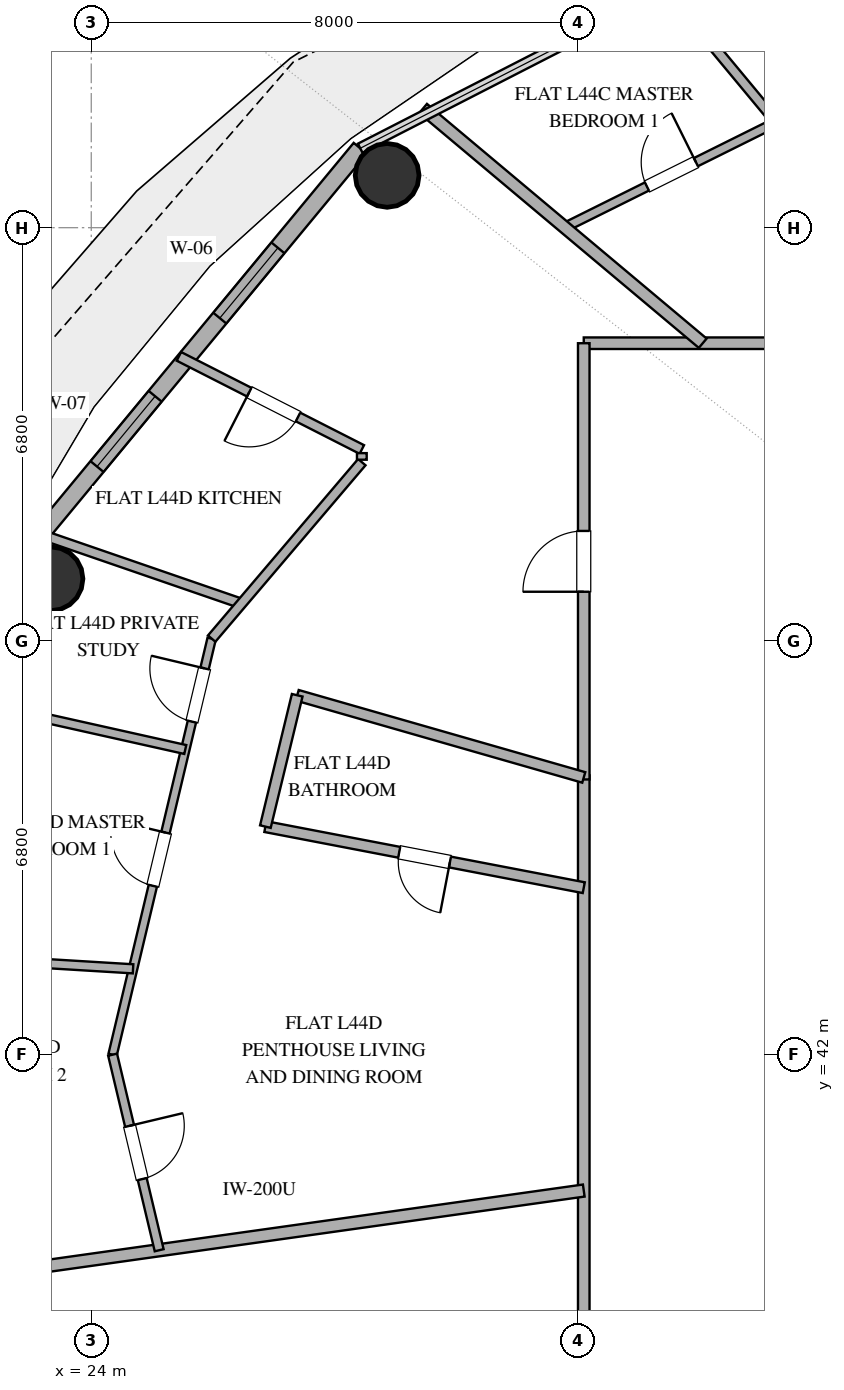
"""IFC4 building model, lengths in metres.
Left out: names, types, materials, properties, quantities, classifications, styles, units other than length and angle.
Written with IfcOpenShell. Run it as: python <this file> out.ifc"""

import sys

from ifc_helpers import new_model, si_unit, direction, frame, frame_2d, origin, origin_2d, place, context, subcontext, project, spatial, rectangle, hollow_circle, extrude, element, fill, save


model = new_model("IFC4")
c1 = context("Model", 3, precision=1e-05, world=origin(), true_north=direction((0.0, 1.0)))
c2 = subcontext(c1, "Body", "Model", "MODEL_VIEW")
j1 = project(units=[si_unit("LENGTHUNIT", "METRE"), si_unit("PLANEANGLEUNIT", "RADIAN")], contexts=[c1])
p1 = place(None, origin())
s1 = spatial("IfcSite", under=j1, at=p1, CompositionType="ELEMENT")
p2 = place(p1, origin())
s2 = spatial("IfcBuilding", under=s1, at=p2, CompositionType="ELEMENT")
p3 = place(p2, frame((0.0, 0.0, 175.8)))
s3 = spatial("IfcBuildingStorey", under=s2, at=p3, CompositionType="ELEMENT", Elevation=175.8)
for number, where, z_axis, x_axis in (
    (1, (28.866, 56.46, 0.0), (0.0, 0.0, 1.0), (1.0, 0.0, 0.0)),
    (2, (23.338, 49.826, 0.0), (0.0, 0.0, 1.0), (1.0, 0.0, 0.0)),
):
    element("IfcColumn", number, at=place(p3, frame(where, z_axis=z_axis, x_axis=x_axis)), inside=s3, PredefinedType="COLUMN", context=c2, shape_type="SweptSolid", body=[
        extrude(hollow_circle(Radius=0.525, WallThickness=0.028, at=origin_2d()), origin(), (0.0, 0.0, 1.0), 3.38),
    ])
p4 = place(p3, frame((28.424, 56.906, 0.0), z_axis=(0.0, 0.0, 1.0), x_axis=(-0.637333477683, -0.770588111915, 0.0)))
e3 = element("IfcWall", 3, at=p4, inside=s3, PredefinedType="SOLIDWALL", context=c2, shape_type="SweptSolid", body=[
    extrude(rectangle(XDim=8.875, YDim=0.28, at=frame_2d((4.438, 0.0))), origin(), (0.0, 0.0, 1.0), 3.38),
])
p5 = place(p4, frame((2.125, 0.0, 0.85)))
e4 = element("IfcOpeningElement", 4, at=p5, cuts=e3, PredefinedType="OPENING", context=c2, shape_type="SweptSolid", body=[
    extrude(rectangle(XDim=1.5, YDim=2.0, at=frame_2d((0.75, 1.0))), frame((0.0, 0.15, 0.0), z_axis=(0.0, -1.0, 0.0), x_axis=(1.0, 0.0, 0.0)), (0.0, 0.0, 1.0), 0.3),
])
p6 = place(p4, frame((5.292, 0.0, 0.85)))
e5 = element("IfcOpeningElement", 5, at=p6, cuts=e3, PredefinedType="OPENING", context=c2, shape_type="SweptSolid", body=[
    extrude(rectangle(XDim=1.5, YDim=1.8, at=frame_2d((0.75, 0.9))), frame((0.0, 0.15, 0.0), z_axis=(0.0, -1.0, 0.0), x_axis=(1.0, 0.0, 0.0)), (0.0, 0.0, 1.0), 0.3),
])
p7 = place(p3, frame((32.1, 53.7, 0.0), z_axis=(0.0, 0.0, 1.0), x_axis=(1.0, 0.0, 0.0)))
e6 = element("IfcWall", 6, at=p7, inside=s3, PredefinedType="PARTITIONING", context=c2, shape_type="SweptSolid", body=[
    extrude(rectangle(XDim=16.061, YDim=0.19, at=frame_2d((8.03, 0.0))), origin(), (0.0, 0.0, 1.0), 2.74),
])
p8 = place(p7, frame((6.907, 0.0, 0.0)))
e7 = element("IfcOpeningElement", 7, at=p8, cuts=e6, PredefinedType="OPENING", context=c2, shape_type="SweptSolid", body=[
    extrude(rectangle(XDim=1.0, YDim=2.2, at=frame_2d((0.5, 1.1))), frame((0.0, 0.105, 0.0), z_axis=(0.0, -1.0, 0.0), x_axis=(1.0, 0.0, 0.0)), (0.0, 0.0, 1.0), 0.21),
])
p9 = place(p3, frame((22.753, 38.452, 0.0), z_axis=(0.0, 0.0, 1.0), x_axis=(0.500584533727, -0.865687659952, 0.0)))
e8 = element("IfcWall", 8, at=p9, inside=s3, PredefinedType="PLUMBINGWALL", context=c2, shape_type="SweptSolid", body=[
    extrude(rectangle(XDim=9.567, YDim=0.16, at=frame_2d((4.783, 0.0))), origin(), (0.0, 0.0, 1.0), 2.74),
])
p10 = place(p9, frame((5.233, 0.0, 0.0)))
e9 = element("IfcOpeningElement", 9, at=p10, cuts=e8, PredefinedType="OPENING", context=c2, shape_type="SweptSolid", body=[
    extrude(rectangle(XDim=0.9, YDim=2.1, at=frame_2d((0.45, 1.05))), frame((0.0, 0.09, 0.0), z_axis=(0.0, -1.0, 0.0), x_axis=(1.0, 0.0, 0.0)), (0.0, 0.0, 1.0), 0.18),
])
p11 = place(p3, frame((32.1, 46.593, 0.0), z_axis=(0.0, 0.0, 1.0), x_axis=(0.0, -1.0, 0.0)))
e10 = element("IfcWall", 10, at=p11, inside=s3, PredefinedType="PARTITIONING", context=c2, shape_type="SweptSolid", body=[
    extrude(rectangle(XDim=16.292, YDim=0.19, at=frame_2d((8.146, 0.0))), origin(), (0.0, 0.0, 1.0), 2.74),
])
p12 = place(p3, frame((32.1, 46.526, 0.0), z_axis=(0.0, 0.0, 1.0), x_axis=(0.0, 1.0, 0.0)))
e11 = element("IfcWall", 11, at=p12, inside=s3, PredefinedType="PARTITIONING", context=c2, shape_type="SweptSolid", body=[
    extrude(rectangle(XDim=7.174, YDim=0.19, at=frame_2d((3.587, 0.0))), origin(), (0.0, 0.0, 1.0), 2.74),
])
p13 = place(p12, frame((3.087, 0.0, 0.0)))
e12 = element("IfcOpeningElement", 12, at=p13, cuts=e11, PredefinedType="OPENING", context=c2, shape_type="SweptSolid", body=[
    extrude(rectangle(XDim=1.0, YDim=2.2, at=frame_2d((0.5, 1.1))), frame((0.0, 0.105, 0.0), z_axis=(0.0, -1.0, 0.0), x_axis=(1.0, 0.0, 0.0)), (0.0, 0.0, 1.0), 0.21),
])
p14 = place(p3, frame((21.635, 38.295, 0.0), z_axis=(0.0, 0.0, 1.0), x_axis=(0.990268074466, 0.139173060229, 0.0)))
e13 = element("IfcWall", 13, at=p14, inside=s3, PredefinedType="PARTITIONING", context=c2, shape_type="SweptSolid", body=[
    extrude(rectangle(XDim=10.567, YDim=0.2, at=frame_2d((5.284, 0.0))), origin(), (0.0, 0.0, 1.0), 2.74),
])
p15 = place(p3, frame((32.1, 44.746, 0.0), z_axis=(0.0, 0.0, 1.0), x_axis=(-0.982104947805, 0.188334467098, 0.0)))
e14 = element("IfcWall", 14, at=p15, inside=s3, PredefinedType="PLUMBINGWALL", context=c2, shape_type="SweptSolid", body=[
    extrude(rectangle(XDim=5.332, YDim=0.18, at=frame_2d((2.666, 0.0))), origin(), (0.0, 0.0, 1.0), 2.74),
])
p16 = place(p15, frame((2.241, 0.0, 0.0)))
e15 = element("IfcOpeningElement", 15, at=p16, cuts=e14, PredefinedType="OPENING", context=c2, shape_type="SweptSolid", body=[
    extrude(rectangle(XDim=0.85, YDim=2.1, at=frame_2d((0.425, 1.05))), frame((0.0, 0.1, 0.0), z_axis=(0.0, -1.0, 0.0), x_axis=(1.0, 0.0, 0.0)), (0.0, 0.0, 1.0), 0.2),
])
p17 = place(p3, frame((27.387, 47.911, 0.0), z_axis=(0.0, 0.0, 1.0), x_axis=(0.961266088446, -0.27562203686, 0.0)))
e16 = element("IfcWall", 16, at=p17, inside=s3, PredefinedType="PLUMBINGWALL", context=c2, shape_type="SweptSolid", body=[
    extrude(rectangle(XDim=4.903, YDim=0.18, at=frame_2d((2.451, 0.0))), origin(), (0.0, 0.0, 1.0), 2.74),
])
p18 = place(p3, frame((31.786, 55.605, 0.0), z_axis=(0.0, 0.0, 1.0), x_axis=(0.895458573673, 0.445144856013, 0.0)))
e17 = element("IfcWall", 17, at=p18, inside=s3, PredefinedType="PARTITIONING", context=c2, shape_type="SweptSolid", body=[
    extrude(rectangle(XDim=3.92, YDim=0.15, at=frame_2d((1.96, 0.0))), origin(), (0.0, 0.0, 1.0), 2.74),
])
p19 = place(p18, frame((1.51, 0.0, 0.0)))
e18 = element("IfcOpeningElement", 18, at=p19, cuts=e17, PredefinedType="OPENING", context=c2, shape_type="SweptSolid", body=[
    extrude(rectangle(XDim=0.9, YDim=2.1, at=frame_2d((0.45, 1.05))), frame((0.0, 0.085, 0.0), z_axis=(0.0, -1.0, 0.0), x_axis=(1.0, 0.0, 0.0)), (0.0, 0.0, 1.0), 0.17),
])
p20 = place(p3, frame((24.351, 42.0, 0.0), z_axis=(0.0, 0.0, 1.0), x_axis=(0.231658068135, 0.972797275627, 0.0)))
e19 = element("IfcWall", 19, at=p20, inside=s3, PredefinedType="PARTITIONING", context=c2, shape_type="SweptSolid", body=[
    extrude(rectangle(XDim=7.034, YDim=0.14, at=frame_2d((3.517, 0.0))), origin(), (0.0, 0.0, 1.0), 2.74),
])
p21 = place(p20, frame((2.855, 0.0, 0.0)))
e20 = element("IfcOpeningElement", 20, at=p21, cuts=e19, PredefinedType="OPENING", context=c2, shape_type="SweptSolid", body=[
    extrude(rectangle(XDim=0.9, YDim=2.1, at=frame_2d((0.45, 1.05))), frame((0.0, 0.08, 0.0), z_axis=(0.0, -1.0, 0.0), x_axis=(1.0, 0.0, 0.0)), (0.0, 0.0, 1.0), 0.16),
])
p22 = place(p20, frame((5.63, 0.0, 0.0)))
e21 = element("IfcOpeningElement", 21, at=p22, cuts=e19, PredefinedType="OPENING", context=c2, shape_type="SweptSolid", body=[
    extrude(rectangle(XDim=0.9, YDim=2.1, at=frame_2d((0.45, 1.05))), frame((0.0, 0.08, 0.0), z_axis=(0.0, -1.0, 0.0), x_axis=(1.0, 0.0, 0.0)), (0.0, 0.0, 1.0), 0.16),
])
p23 = place(p3, frame((26.471, 49.418, 0.0), z_axis=(0.0, 0.0, 1.0), x_axis=(-0.945442677411, 0.325788495392, 0.0)))
e22 = element("IfcWall", 22, at=p23, inside=s3, PredefinedType="PLUMBINGWALL", context=c2, shape_type="SweptSolid", body=[
    extrude(rectangle(XDim=3.61, YDim=0.16, at=frame_2d((1.805, 0.0))), origin(), (0.0, 0.0, 1.0), 2.74),
])
p24 = place(p3, frame((21.156, 43.626, 0.0), z_axis=(0.0, 0.0, 1.0), x_axis=(0.998171777701, -0.060440898408, 0.0)))
e23 = element("IfcWall", 23, at=p24, inside=s3, PredefinedType="PARTITIONING", context=c2, shape_type="SweptSolid", body=[
    extrude(rectangle(XDim=3.538, YDim=0.15, at=frame_2d((1.769, 0.0))), origin(), (0.0, 0.0, 1.0), 2.74),
])
p25 = place(p3, frame((25.546, 47.019, 0.0), z_axis=(0.0, 0.0, 1.0), x_axis=(-0.975921546644, 0.218121834754, 0.0)))
e24 = element("IfcWall", 24, at=p25, inside=s3, PredefinedType="PARTITIONING", context=c2, shape_type="SweptSolid", body=[
    extrude(rectangle(XDim=3.515, YDim=0.15, at=frame_2d((1.757, 0.0))), origin(), (0.0, 0.0, 1.0), 2.74),
])
p26 = place(p3, frame((28.45, 51.952, 0.0), z_axis=(0.0, 0.0, 1.0), x_axis=(-0.891148759763, 0.453711238535, 0.0)))
e25 = element("IfcWall", 25, at=p26, inside=s3, PredefinedType="PLUMBINGWALL", context=c2, shape_type="SweptSolid", body=[
    extrude(rectangle(XDim=3.375, YDim=0.16, at=frame_2d((1.688, 0.0))), origin(), (0.0, 0.0, 1.0), 2.74),
])
p27 = place(p26, frame((1.178, 0.0, 0.0)))
e26 = element("IfcOpeningElement", 26, at=p27, cuts=e25, PredefinedType="OPENING", context=c2, shape_type="SweptSolid", body=[
    extrude(rectangle(XDim=0.9, YDim=2.1, at=frame_2d((0.45, 1.05))), frame((0.0, 0.09, 0.0), z_axis=(0.0, -1.0, 0.0), x_axis=(1.0, 0.0, 0.0)), (0.0, 0.0, 1.0), 0.18),
])
p28 = place(p3, frame((24.351, 42.0, 0.0), z_axis=(0.0, 0.0, 1.0), x_axis=(0.231590575549, -0.972813345569, 0.0)))
e27 = element("IfcWall", 27, at=p28, inside=s3, PredefinedType="PARTITIONING", context=c2, shape_type="SweptSolid", body=[
    extrude(rectangle(XDim=3.306, YDim=0.15, at=frame_2d((1.653, 0.0))), origin(), (0.0, 0.0, 1.0), 2.74),
])
p29 = place(p28, frame((1.203, 0.0, 0.0)))
e28 = element("IfcOpeningElement", 28, at=p29, cuts=e27, PredefinedType="OPENING", context=c2, shape_type="SweptSolid", body=[
    extrude(rectangle(XDim=0.9, YDim=2.1, at=frame_2d((0.45, 1.05))), frame((0.0, 0.085, 0.0), z_axis=(0.0, -1.0, 0.0), x_axis=(1.0, 0.0, 0.0)), (0.0, 0.0, 1.0), 0.17),
])
p30 = place(p3, frame((25.981, 48.842, 0.0), z_axis=(0.0, 0.0, 1.0), x_axis=(0.648022171798, 0.761621470849, 0.0)))
e29 = element("IfcWall", 29, at=p30, inside=s3, PredefinedType="PLUMBINGWALL", context=c2, shape_type="SweptSolid", body=[
    extrude(rectangle(XDim=3.81, YDim=0.16, at=frame_2d((1.905, 0.0))), origin(), (0.0, 0.0, 1.0), 2.74),
])
p31 = place(p3, frame((34.056, 53.7, 0.0), z_axis=(0.0, 0.0, 1.0), x_axis=(-0.766037176398, 0.642796269728, 0.0)))
e30 = element("IfcWall", 30, at=p31, inside=s3, PredefinedType="PARTITIONING", context=c2, shape_type="SweptSolid", body=[
    extrude(rectangle(XDim=6.004, YDim=0.2, at=frame_2d((3.002, 0.0))), origin(), (0.0, 0.0, 1.0), 2.74),
])
p32 = place(p3, frame((35.264, 57.339, 0.0), z_axis=(0.0, 0.0, 1.0), x_axis=(-0.638753509407, 0.769411433643, 0.0)))
e31 = element("IfcWall", 31, at=p32, inside=s3, PredefinedType="PLUMBINGWALL", context=c2, shape_type="SweptSolid", body=[
    extrude(rectangle(XDim=2.922, YDim=0.16, at=frame_2d((1.461, 0.0))), origin(), (0.0, 0.0, 1.0), 2.74),
])
p33 = place(p3, frame((26.864, 45.75, 0.0), z_axis=(0.0, 0.0, 1.0), x_axis=(0.235499423966, 0.971874488456, 0.0)))
e32 = element("IfcWall", 32, at=p33, inside=s3, PredefinedType="PLUMBINGWALL", context=c2, shape_type="SweptSolid", body=[
    extrude(rectangle(XDim=2.223, YDim=0.18, at=frame_2d((1.111, 0.0))), origin(), (0.0, 0.0, 1.0), 2.74),
])
p34 = place(p3, frame((28.45, 51.784, 0.0), z_axis=(0.0, 0.0, 1.0), x_axis=(0.0, 1.0, 0.0)))
e33 = element("IfcWall", 33, at=p34, inside=s3, PredefinedType="PLUMBINGWALL", context=c2, shape_type="SweptSolid", body=[
    extrude(rectangle(XDim=0.108, YDim=0.16, at=frame_2d((0.054, 0.0))), origin(), (0.0, 0.0, 1.0), 2.74),
])
p35 = place(p5, origin())
e34 = element("IfcWindow", 34, at=p35, inside=s3, PartitioningType="SINGLE_PANEL", PredefinedType="WINDOW", context=c2, shape_type="SweptSolid", body=[
    extrude(rectangle(XDim=1.5, YDim=2.0, at=frame_2d((0.75, 1.0))), frame((0.0, 0.03, 0.0), z_axis=(0.0, -1.0, 0.0), x_axis=(1.0, 0.0, 0.0)), (0.0, 0.0, 1.0), 0.06),
])
fill(e4, e34)
p36 = place(p6, origin())
e35 = element("IfcWindow", 35, at=p36, inside=s3, PartitioningType="SINGLE_PANEL", PredefinedType="WINDOW", context=c2, shape_type="SweptSolid", body=[
    extrude(rectangle(XDim=1.5, YDim=1.8, at=frame_2d((0.75, 0.9))), frame((0.0, 0.03, 0.0), z_axis=(0.0, -1.0, 0.0), x_axis=(1.0, 0.0, 0.0)), (0.0, 0.0, 1.0), 0.06),
])
fill(e5, e35)
p37 = place(p13, origin())
e36 = element("IfcDoor", 36, at=p37, inside=s3, OperationType="SINGLE_SWING_LEFT", PredefinedType="DOOR", context=c2, shape_type="SweptSolid", body=[
    extrude(rectangle(XDim=1.0, YDim=2.2, at=frame_2d((0.5, 1.1))), frame((0.0, 0.025, 0.0), z_axis=(0.0, -1.0, 0.0), x_axis=(1.0, 0.0, 0.0)), (0.0, 0.0, 1.0), 0.05),
])
fill(e12, e36)
p38 = place(p16, origin())
e37 = element("IfcDoor", 37, at=p38, inside=s3, OperationType="SINGLE_SWING_LEFT", PredefinedType="DOOR", context=c2, shape_type="SweptSolid", body=[
    extrude(rectangle(XDim=0.85, YDim=2.1, at=frame_2d((0.425, 1.05))), frame((0.0, 0.025, 0.0), z_axis=(0.0, -1.0, 0.0), x_axis=(1.0, 0.0, 0.0)), (0.0, 0.0, 1.0), 0.05),
])
fill(e15, e37)
p39 = place(p19, origin())
e38 = element("IfcDoor", 38, at=p39, inside=s3, OperationType="SINGLE_SWING_RIGHT", PredefinedType="DOOR", context=c2, shape_type="SweptSolid", body=[
    extrude(rectangle(XDim=0.9, YDim=2.1, at=frame_2d((0.45, 1.05))), frame((0.0, 0.025, 0.0), z_axis=(0.0, -1.0, 0.0), x_axis=(1.0, 0.0, 0.0)), (0.0, 0.0, 1.0), 0.05),
])
fill(e18, e38)
p40 = place(p21, origin())
e39 = element("IfcDoor", 39, at=p40, inside=s3, OperationType="SINGLE_SWING_RIGHT", PredefinedType="DOOR", context=c2, shape_type="SweptSolid", body=[
    extrude(rectangle(XDim=0.9, YDim=2.1, at=frame_2d((0.45, 1.05))), frame((0.0, 0.025, 0.0), z_axis=(0.0, -1.0, 0.0), x_axis=(1.0, 0.0, 0.0)), (0.0, 0.0, 1.0), 0.05),
])
fill(e20, e39)
p41 = place(p22, origin())
e40 = element("IfcDoor", 40, at=p41, inside=s3, OperationType="SINGLE_SWING_RIGHT", PredefinedType="DOOR", context=c2, shape_type="SweptSolid", body=[
    extrude(rectangle(XDim=0.9, YDim=2.1, at=frame_2d((0.45, 1.05))), frame((0.0, 0.025, 0.0), z_axis=(0.0, -1.0, 0.0), x_axis=(1.0, 0.0, 0.0)), (0.0, 0.0, 1.0), 0.05),
])
fill(e21, e40)
p42 = place(p27, origin())
e41 = element("IfcDoor", 41, at=p42, inside=s3, OperationType="SINGLE_SWING_RIGHT", PredefinedType="DOOR", context=c2, shape_type="SweptSolid", body=[
    extrude(rectangle(XDim=0.9, YDim=2.1, at=frame_2d((0.45, 1.05))), frame((0.0, 0.025, 0.0), z_axis=(0.0, -1.0, 0.0), x_axis=(1.0, 0.0, 0.0)), (0.0, 0.0, 1.0), 0.05),
])
fill(e26, e41)
p43 = place(p29, origin())
e42 = element("IfcDoor", 42, at=p43, inside=s3, OperationType="SINGLE_SWING_LEFT", PredefinedType="DOOR", context=c2, shape_type="SweptSolid", body=[
    extrude(rectangle(XDim=0.9, YDim=2.1, at=frame_2d((0.45, 1.05))), frame((0.0, 0.025, 0.0), z_axis=(0.0, -1.0, 0.0), x_axis=(1.0, 0.0, 0.0)), (0.0, 0.0, 1.0), 0.05),
])
fill(e28, e42)
save(model, sys.argv[1])
